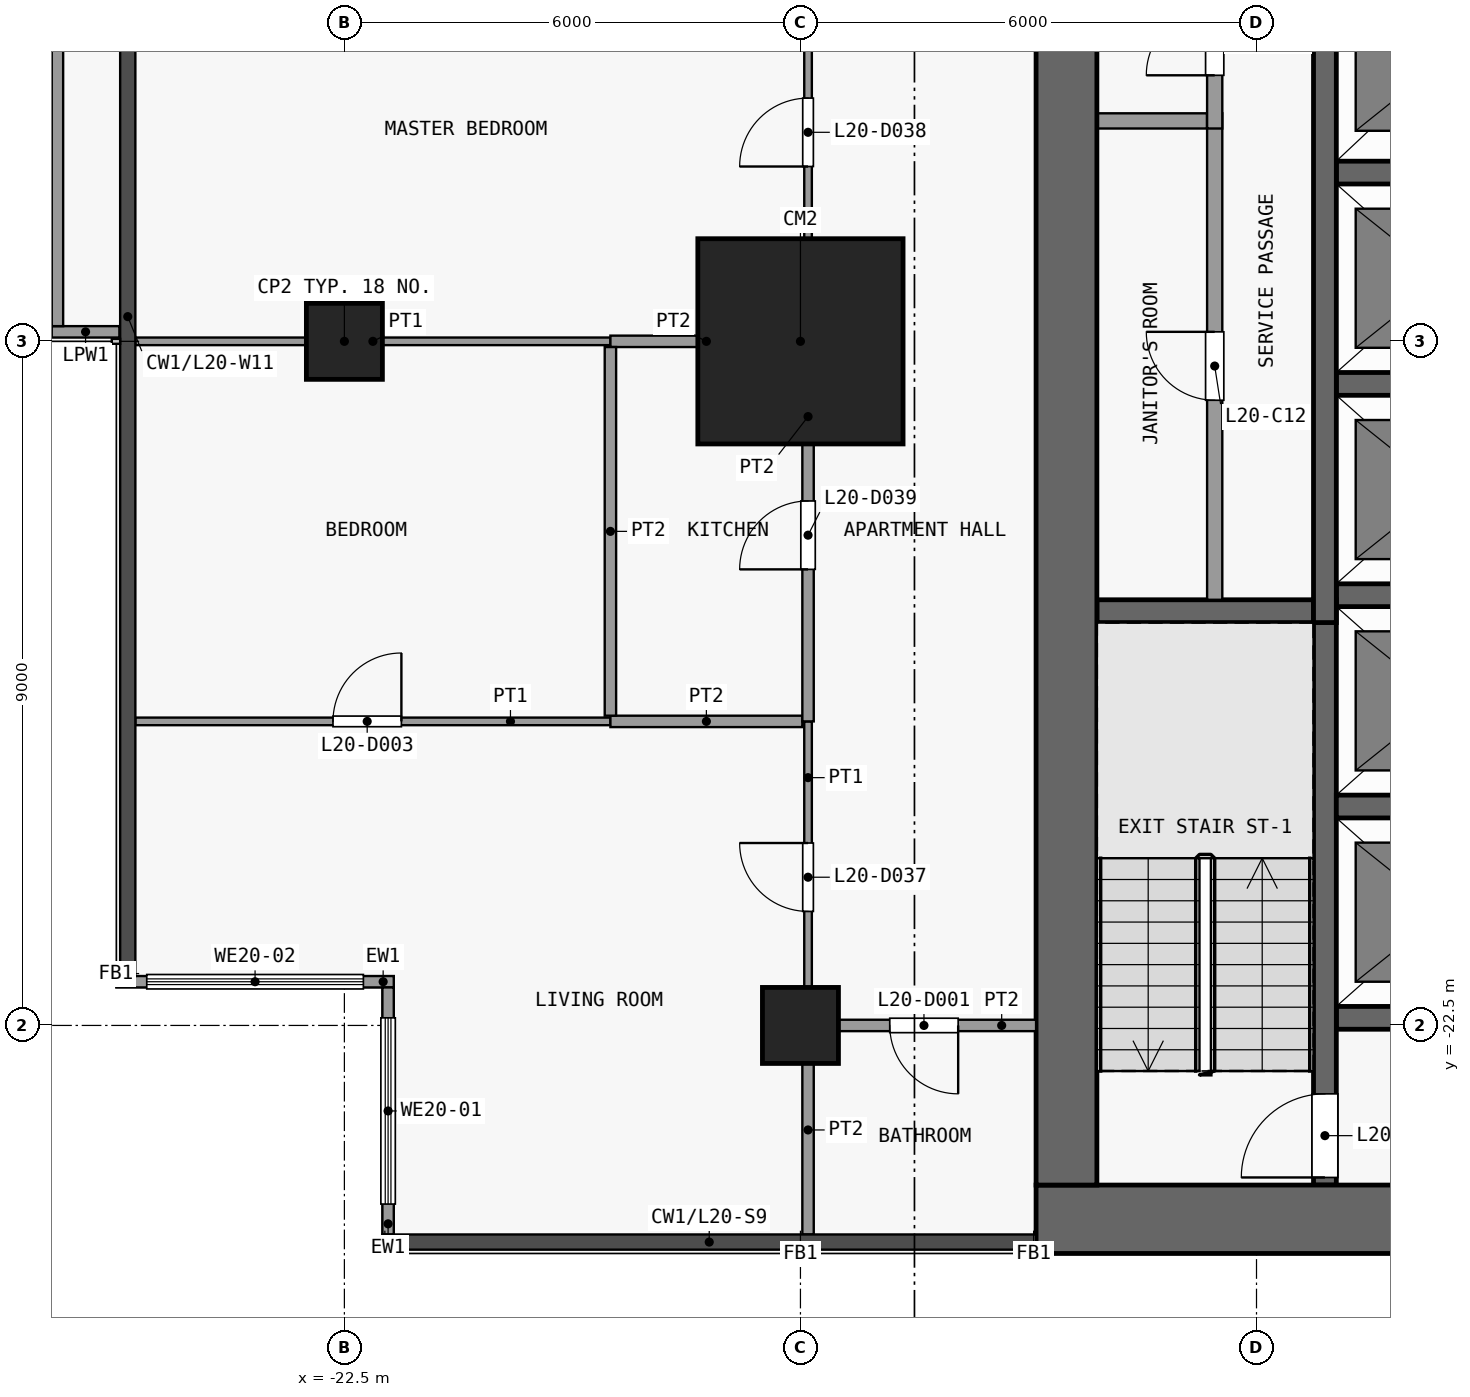
"""IFC4 building model, lengths in metres.
Left out: names, types, materials, properties, quantities, classifications, styles, units other than length and angle.
Written with IfcOpenShell. Run it as: python <this file> out.ifc"""

import sys

from ifc_helpers import new_model, si_unit, direction, frame, frame_2d, origin, origin_2d, place, context, subcontext, project, spatial, rectangle, extrude, element, fill, save


model = new_model("IFC4")
c1 = context("Model", 3, precision=1e-05, world=origin(), true_north=direction((0.0, 1.0)))
c2 = subcontext(c1, "Body", "Model", "MODEL_VIEW")
j1 = project(units=[si_unit("LENGTHUNIT", "METRE"), si_unit("PLANEANGLEUNIT", "RADIAN")], contexts=[c1])
p1 = place(None, origin())
s1 = spatial("IfcSite", under=j1, at=p1, CompositionType="ELEMENT")
p2 = place(p1, origin())
s2 = spatial("IfcBuilding", under=s1, at=p2, CompositionType="ELEMENT")
p3 = place(p2, frame((0.0, 0.0, 84.7)))
s3 = spatial("IfcBuildingStorey", under=s2, at=p3, CompositionType="ELEMENT", Elevation=84.7)
for number, where, z_axis, x_axis in (
    (1, (-22.5, -13.5, 0.0), (0.0, 0.0, 1.0), (1.0, 0.0, 0.0)),
    (2, (-16.5, -22.5, 0.0), (0.0, 0.0, 1.0), (1.0, 0.0, 0.0)),
):
    element("IfcColumn", number, at=place(p3, frame(where, z_axis=z_axis, x_axis=x_axis)), inside=s3, PredefinedType="COLUMN", context=c2, shape_type="SweptSolid", body=[
        extrude(rectangle(XDim=1.0, YDim=1.0, at=origin_2d()), origin(), (0.0, 0.0, 1.0), 3.6),
    ])
p4 = place(p3, frame((-16.5, -13.5, 0.0), z_axis=(0.0, 0.0, 1.0), x_axis=(1.0, 0.0, 0.0)))
e3 = element("IfcColumn", 3, at=p4, inside=s3, PredefinedType="COLUMN", context=c2, shape_type="SweptSolid", body=[
    extrude(rectangle(XDim=2.7, YDim=2.7, at=origin_2d()), origin(), (0.0, 0.0, 1.0), 3.6),
])
p5 = place(p3, frame((-13.4, -25.05, 0.0), z_axis=(0.0, 0.0, 1.0), x_axis=(1.0, 0.0, 0.0)))
e4 = element("IfcWall", 4, at=p5, inside=s3, PredefinedType="SHEAR", context=c2, shape_type="SweptSolid", body=[
    extrude(rectangle(XDim=26.8, YDim=0.9, at=frame_2d((13.4, 0.0))), origin(), (0.0, 0.0, 1.0), 3.3),
])
p6 = place(p3, frame((-13.0, -24.6, 0.0), z_axis=(0.0, 0.0, 1.0), x_axis=(0.0, 1.0, 0.0)))
e5 = element("IfcWall", 5, at=p6, inside=s3, PredefinedType="SHEAR", context=c2, shape_type="SweptSolid", body=[
    extrude(rectangle(XDim=16.1, YDim=0.8, at=frame_2d((8.05, 0.0))), origin(), (0.0, 0.0, 1.0), 3.3),
])
for number, where, z_axis, x_axis in (
    (6, (-9.45, -22.4, 0.0), (0.0, 0.0, 1.0), (1.0, 0.0, 0.0)),
    (7, (-9.45, -19.62, 0.0), (0.0, 0.0, 1.0), (1.0, 0.0, 0.0)),
):
    element("IfcWall", number, at=place(p3, frame(where, z_axis=z_axis, x_axis=x_axis)), inside=s3, PredefinedType="SHEAR", context=c2, shape_type="SweptSolid", body=[
        extrude(rectangle(XDim=2.8, YDim=0.3, at=frame_2d((1.4, 0.0))), origin(), (0.0, 0.0, 1.0), 3.3),
    ])
p7 = place(p3, frame((-12.6, -17.05, 0.0), z_axis=(0.0, 0.0, 1.0), x_axis=(1.0, 0.0, 0.0)))
e8 = element("IfcWall", 8, at=p7, inside=s3, PredefinedType="SHEAR", context=c2, shape_type="SweptSolid", body=[
    extrude(rectangle(XDim=2.85, YDim=0.3, at=frame_2d((1.425, 0.0))), origin(), (0.0, 0.0, 1.0), 3.3),
])
for number, where, z_axis, x_axis in (
    (9, (-9.45, -16.84, 0.0), (0.0, 0.0, 1.0), (1.0, 0.0, 0.0)),
    (10, (-9.45, -14.06, 0.0), (0.0, 0.0, 1.0), (1.0, 0.0, 0.0)),
    (11, (-9.45, -11.28, 0.0), (0.0, 0.0, 1.0), (1.0, 0.0, 0.0)),
):
    element("IfcWall", number, at=place(p3, frame(where, z_axis=z_axis, x_axis=x_axis)), inside=s3, PredefinedType="SHEAR", context=c2, shape_type="SweptSolid", body=[
        extrude(rectangle(XDim=2.8, YDim=0.3, at=frame_2d((1.4, 0.0))), origin(), (0.0, 0.0, 1.0), 3.3),
    ])
p8 = place(p3, frame((-12.6, -10.6, 0.0), z_axis=(0.0, 0.0, 1.0), x_axis=(1.0, 0.0, 0.0)))
e12 = element("IfcWall", 12, at=p8, inside=s3, PredefinedType="PARTITIONING", context=c2, shape_type="SweptSolid", body=[
    extrude(rectangle(XDim=1.45, YDim=0.2, at=frame_2d((0.725, 0.0))), origin(), (0.0, 0.0, 1.0), 3.3),
])
p9 = place(p3, frame((-11.05, -16.9, 0.0), z_axis=(0.0, 0.0, 1.0), x_axis=(0.0, 1.0, 0.0)))
e13 = element("IfcWall", 13, at=p9, inside=s3, PredefinedType="PARTITIONING", context=c2, shape_type="SweptSolid", body=[
    extrude(rectangle(XDim=6.4, YDim=0.2, at=frame_2d((3.2, 0.0))), origin(), (0.0, 0.0, 1.0), 3.3),
])
p10 = place(p9, frame((2.625, 0.0, 0.0)))
e14 = element("IfcOpeningElement", 14, at=p10, cuts=e13, PredefinedType="OPENING", context=c2, shape_type="SweptSolid", body=[
    extrude(rectangle(XDim=0.9, YDim=2.1, at=frame_2d((0.45, 1.05))), frame((0.0, 0.11, 0.0), z_axis=(0.0, -1.0, 0.0), x_axis=(1.0, 0.0, 0.0)), (0.0, 0.0, 1.0), 0.22),
])
p11 = place(p3, frame((-11.05, -10.7, 0.0), z_axis=(0.0, 0.0, 1.0), x_axis=(0.0, 1.0, 0.0)))
e15 = element("IfcWall", 15, at=p11, inside=s3, PredefinedType="PARTITIONING", context=c2, shape_type="SweptSolid", body=[
    extrude(rectangle(XDim=2.2, YDim=0.2, at=frame_2d((1.1, 0.0))), origin(), (0.0, 0.0, 1.0), 3.3),
])
p12 = place(p11, frame((0.7, 0.0, 0.0)))
e16 = element("IfcOpeningElement", 16, at=p12, cuts=e15, PredefinedType="OPENING", context=c2, shape_type="SweptSolid", body=[
    extrude(rectangle(XDim=0.9, YDim=2.1, at=frame_2d((0.45, 1.05))), frame((0.0, 0.11, 0.0), z_axis=(0.0, -1.0, 0.0), x_axis=(1.0, 0.0, 0.0)), (0.0, 0.0, 1.0), 0.22),
])
p13 = place(p3, frame((-9.6, -24.6, 0.0), z_axis=(0.0, 0.0, 1.0), x_axis=(0.0, 1.0, 0.0)))
e17 = element("IfcWall", 17, at=p13, inside=s3, PredefinedType="SHEAR", context=c2, shape_type="SweptSolid", body=[
    extrude(rectangle(XDim=7.7, YDim=0.3, at=frame_2d((3.85, 0.0))), origin(), (0.0, 0.0, 1.0), 3.3),
])
p14 = place(p13, frame((0.1, 0.0, 0.0)))
e18 = element("IfcOpeningElement", 18, at=p14, cuts=e17, PredefinedType="OPENING", context=c2, shape_type="SweptSolid", body=[
    extrude(rectangle(XDim=1.1, YDim=2.1, at=frame_2d((0.55, 1.05))), frame((0.0, 0.16, 0.0), z_axis=(0.0, -1.0, 0.0), x_axis=(1.0, 0.0, 0.0)), (0.0, 0.0, 1.0), 0.32),
])
p15 = place(p3, frame((-9.6, -17.2, 0.0), z_axis=(0.0, 0.0, 1.0), x_axis=(0.0, 1.0, 0.0)))
e19 = element("IfcWall", 19, at=p15, inside=s3, PredefinedType="SHEAR", context=c2, shape_type="SweptSolid", body=[
    extrude(rectangle(XDim=8.7, YDim=0.3, at=frame_2d((4.35, 0.0))), origin(), (0.0, 0.0, 1.0), 3.3),
])
p16 = place(p3, frame((-21.925, -25.25, 0.0), z_axis=(0.0, 0.0, 1.0), x_axis=(0.0, 1.0, 0.0)))
e20 = element("IfcWall", 20, at=p16, inside=s3, PredefinedType="SOLIDWALL", context=c2, shape_type="SweptSolid", body=[
    extrude(rectangle(XDim=3.25, YDim=0.15, at=frame_2d((1.625, 0.0))), origin(), (0.0, 0.0, 1.0), 3.3),
])
p17 = place(p16, frame((0.4, 0.0, 0.9)))
e21 = element("IfcOpeningElement", 21, at=p17, cuts=e20, PredefinedType="OPENING", context=c2, shape_type="SweptSolid", body=[
    extrude(rectangle(XDim=2.45, YDim=2.4, at=frame_2d((1.225, 1.2))), frame((0.0, 0.085, 0.0), z_axis=(0.0, -1.0, 0.0), x_axis=(1.0, 0.0, 0.0)), (0.0, 0.0, 1.0), 0.17),
])
p18 = place(p3, frame((-21.85, -21.925, 0.0), z_axis=(0.0, 0.0, 1.0), x_axis=(-1.0, 0.0, 0.0)))
e22 = element("IfcWall", 22, at=p18, inside=s3, PredefinedType="SOLIDWALL", context=c2, shape_type="SweptSolid", body=[
    extrude(rectangle(XDim=3.65, YDim=0.15, at=frame_2d((1.825, 0.0))), origin(), (0.0, 0.0, 1.0), 3.3),
])
p19 = place(p18, frame((0.4, 0.0, 0.9)))
e23 = element("IfcOpeningElement", 23, at=p19, cuts=e22, PredefinedType="OPENING", context=c2, shape_type="SweptSolid", body=[
    extrude(rectangle(XDim=2.85, YDim=2.4, at=frame_2d((1.425, 1.2))), frame((0.0, 0.085, 0.0), z_axis=(0.0, -1.0, 0.0), x_axis=(1.0, 0.0, 0.0)), (0.0, 0.0, 1.0), 0.17),
])
p20 = place(p3, frame((-25.46, -13.375, 0.0), z_axis=(0.0, 0.0, 1.0), x_axis=(-1.0, 0.0, 0.0)))
e24 = element("IfcWall", 24, at=p20, inside=s3, PredefinedType="PARAPET", context=c2, shape_type="SweptSolid", body=[
    extrude(rectangle(XDim=0.89, YDim=0.15, at=frame_2d((0.445, 0.0))), origin(), (0.0, 0.0, 1.0), 1.15),
])
p21 = place(p3, frame((-26.275, -13.3, 0.0), z_axis=(0.0, 0.0, 1.0), x_axis=(0.0, 1.0, 0.0)))
e25 = element("IfcWall", 25, at=p21, inside=s3, PredefinedType="PARAPET", context=c2, shape_type="SweptSolid", body=[
    extrude(rectangle(XDim=8.84, YDim=0.15, at=frame_2d((4.42, 0.0))), origin(), (0.0, 0.0, 1.0), 1.15),
])
p22 = place(p3, frame((-16.325, -22.5, 0.0), z_axis=(0.0, 0.0, 1.0), x_axis=(1.0, 0.0, 0.0)))
e26 = element("IfcWall", 26, at=p22, inside=s3, PredefinedType="PARTITIONING", context=c2, shape_type="SweptSolid", body=[
    extrude(rectangle(XDim=2.925, YDim=0.15, at=frame_2d((1.462, 0.0))), origin(), (0.0, 0.0, 1.0), 3.3),
])
p23 = place(p22, frame((1.0, 0.0, 0.0)))
e27 = element("IfcOpeningElement", 27, at=p23, cuts=e26, PredefinedType="OPENING", context=c2, shape_type="SweptSolid", body=[
    extrude(rectangle(XDim=0.9, YDim=2.1, at=frame_2d((0.45, 1.05))), frame((0.0, 0.085, 0.0), z_axis=(0.0, -1.0, 0.0), x_axis=(1.0, 0.0, 0.0)), (0.0, 0.0, 1.0), 0.17),
])
p24 = place(p3, frame((-25.25, -18.5, 0.0), z_axis=(0.0, 0.0, 1.0), x_axis=(1.0, 0.0, 0.0)))
e28 = element("IfcWall", 28, at=p24, inside=s3, PredefinedType="PARTITIONING", context=c2, shape_type="SweptSolid", body=[
    extrude(rectangle(XDim=6.25, YDim=0.1, at=frame_2d((3.125, 0.0))), origin(), (0.0, 0.0, 1.0), 3.3),
])
p25 = place(p24, frame((2.6, 0.0, 0.0)))
e29 = element("IfcOpeningElement", 29, at=p25, cuts=e28, PredefinedType="OPENING", context=c2, shape_type="SweptSolid", body=[
    extrude(rectangle(XDim=0.9, YDim=2.1, at=frame_2d((0.45, 1.05))), frame((0.0, 0.06, 0.0), z_axis=(0.0, -1.0, 0.0), x_axis=(1.0, 0.0, 0.0)), (0.0, 0.0, 1.0), 0.12),
])
p26 = place(p3, frame((-19.0, -18.5, 0.0), z_axis=(0.0, 0.0, 1.0), x_axis=(1.0, 0.0, 0.0)))
e30 = element("IfcWall", 30, at=p26, inside=s3, PredefinedType="PARTITIONING", context=c2, shape_type="SweptSolid", body=[
    extrude(rectangle(XDim=2.525, YDim=0.15, at=frame_2d((1.262, 0.0))), origin(), (0.0, 0.0, 1.0), 3.3),
])
p27 = place(p3, frame((-25.25, -13.5, 0.0), z_axis=(0.0, 0.0, 1.0), x_axis=(1.0, 0.0, 0.0)))
e31 = element("IfcWall", 31, at=p27, inside=s3, PredefinedType="PARTITIONING", context=c2, shape_type="SweptSolid", body=[
    extrude(rectangle(XDim=6.25, YDim=0.1, at=frame_2d((3.125, 0.0))), origin(), (0.0, 0.0, 1.0), 3.3),
])
p28 = place(p3, frame((-19.0, -13.5, 0.0), z_axis=(0.0, 0.0, 1.0), x_axis=(1.0, 0.0, 0.0)))
e32 = element("IfcWall", 32, at=p28, inside=s3, PredefinedType="PARTITIONING", context=c2, shape_type="SweptSolid", body=[
    extrude(rectangle(XDim=2.525, YDim=0.15, at=frame_2d((1.262, 0.0))), origin(), (0.0, 0.0, 1.0), 3.3),
])
p29 = place(p3, frame((-19.0, -18.425, 0.0), z_axis=(0.0, 0.0, 1.0), x_axis=(0.0, 1.0, 0.0)))
e33 = element("IfcWall", 33, at=p29, inside=s3, PredefinedType="PARTITIONING", context=c2, shape_type="SweptSolid", body=[
    extrude(rectangle(XDim=4.85, YDim=0.15, at=frame_2d((2.425, 0.0))), origin(), (0.0, 0.0, 1.0), 3.3),
])
p30 = place(p3, frame((-16.4, -22.5, 0.0), z_axis=(0.0, 0.0, 1.0), x_axis=(0.0, 1.0, 0.0)))
e34 = element("IfcWall", 34, at=p30, inside=s3, PredefinedType="PARTITIONING", context=c2, shape_type="SweptSolid", body=[
    extrude(rectangle(XDim=4.0, YDim=0.1, at=frame_2d((2.0, 0.0))), origin(), (0.0, 0.0, 1.0), 3.3),
])
p31 = place(p30, frame((1.5, 0.0, 0.0)))
e35 = element("IfcOpeningElement", 35, at=p31, cuts=e34, PredefinedType="OPENING", context=c2, shape_type="SweptSolid", body=[
    extrude(rectangle(XDim=0.9, YDim=2.1, at=frame_2d((0.45, 1.05))), frame((0.0, 0.06, 0.0), z_axis=(0.0, -1.0, 0.0), x_axis=(1.0, 0.0, 0.0)), (0.0, 0.0, 1.0), 0.12),
])
p32 = place(p3, frame((-16.4, -13.5, 0.0), z_axis=(0.0, 0.0, 1.0), x_axis=(0.0, 1.0, 0.0)))
e36 = element("IfcWall", 36, at=p32, inside=s3, PredefinedType="PARTITIONING", context=c2, shape_type="SweptSolid", body=[
    extrude(rectangle(XDim=5.5, YDim=0.1, at=frame_2d((2.75, 0.0))), origin(), (0.0, 0.0, 1.0), 3.3),
])
p33 = place(p32, frame((2.3, 0.0, 0.0)))
e37 = element("IfcOpeningElement", 37, at=p33, cuts=e36, PredefinedType="OPENING", context=c2, shape_type="SweptSolid", body=[
    extrude(rectangle(XDim=0.9, YDim=2.1, at=frame_2d((0.45, 1.05))), frame((0.0, 0.06, 0.0), z_axis=(0.0, -1.0, 0.0), x_axis=(1.0, 0.0, 0.0)), (0.0, 0.0, 1.0), 0.12),
])
p34 = place(p3, frame((-16.4, -25.25, 0.0), z_axis=(0.0, 0.0, 1.0), x_axis=(0.0, 1.0, 0.0)))
e38 = element("IfcWall", 38, at=p34, inside=s3, PredefinedType="PARTITIONING", context=c2, shape_type="SweptSolid", body=[
    extrude(rectangle(XDim=2.75, YDim=0.15, at=frame_2d((1.375, 0.0))), origin(), (0.0, 0.0, 1.0), 3.3),
])
p35 = place(p3, frame((-16.4, -18.5, 0.0), z_axis=(0.0, 0.0, 1.0), x_axis=(0.0, 1.0, 0.0)))
e39 = element("IfcWall", 39, at=p35, inside=s3, PredefinedType="PARTITIONING", context=c2, shape_type="SweptSolid", body=[
    extrude(rectangle(XDim=5.0, YDim=0.15, at=frame_2d((2.5, 0.0))), origin(), (0.0, 0.0, 1.0), 3.3),
])
p36 = place(p35, frame((2.0, 0.0, 0.0)))
e40 = element("IfcOpeningElement", 40, at=p36, cuts=e39, PredefinedType="OPENING", context=c2, shape_type="SweptSolid", body=[
    extrude(rectangle(XDim=0.9, YDim=2.1, at=frame_2d((0.45, 1.05))), frame((0.0, 0.085, 0.0), z_axis=(0.0, -1.0, 0.0), x_axis=(1.0, 0.0, 0.0)), (0.0, 0.0, 1.0), 0.17),
])
p37 = place(p12, origin())
e41 = element("IfcDoor", 41, at=p37, inside=s3, OperationType="SINGLE_SWING_LEFT", PredefinedType="DOOR", context=c2, shape_type="SweptSolid", body=[
    extrude(rectangle(XDim=0.9, YDim=2.1, at=frame_2d((0.45, 1.05))), frame((0.0, 0.025, 0.0), z_axis=(0.0, -1.0, 0.0), x_axis=(1.0, 0.0, 0.0)), (0.0, 0.0, 1.0), 0.05),
])
fill(e16, e41)
p38 = place(p10, origin())
e42 = element("IfcDoor", 42, at=p38, inside=s3, OperationType="SINGLE_SWING_RIGHT", PredefinedType="DOOR", context=c2, shape_type="SweptSolid", body=[
    extrude(rectangle(XDim=0.9, YDim=2.1, at=frame_2d((0.45, 1.05))), frame((0.0, 0.025, 0.0), z_axis=(0.0, -1.0, 0.0), x_axis=(1.0, 0.0, 0.0)), (0.0, 0.0, 1.0), 0.05),
])
fill(e14, e42)
p39 = place(p14, origin())
e43 = element("IfcDoor", 43, at=p39, inside=s3, OperationType="SINGLE_SWING_LEFT", PredefinedType="DOOR", context=c2, shape_type="SweptSolid", body=[
    extrude(rectangle(XDim=1.1, YDim=2.1, at=frame_2d((0.55, 1.05))), frame((0.0, 0.025, 0.0), z_axis=(0.0, -1.0, 0.0), x_axis=(1.0, 0.0, 0.0)), (0.0, 0.0, 1.0), 0.05),
])
fill(e18, e43)
p40 = place(p17, origin())
e44 = element("IfcWindow", 44, at=p40, inside=s3, PartitioningType="SINGLE_PANEL", PredefinedType="WINDOW", context=c2, shape_type="SweptSolid", body=[
    extrude(rectangle(XDim=2.45, YDim=2.4, at=frame_2d((1.225, 1.2))), frame((0.0, 0.03, 0.0), z_axis=(0.0, -1.0, 0.0), x_axis=(1.0, 0.0, 0.0)), (0.0, 0.0, 1.0), 0.06),
])
fill(e21, e44)
p41 = place(p19, origin())
e45 = element("IfcWindow", 45, at=p41, inside=s3, PartitioningType="SINGLE_PANEL", PredefinedType="WINDOW", context=c2, shape_type="SweptSolid", body=[
    extrude(rectangle(XDim=2.85, YDim=2.4, at=frame_2d((1.425, 1.2))), frame((0.0, 0.03, 0.0), z_axis=(0.0, -1.0, 0.0), x_axis=(1.0, 0.0, 0.0)), (0.0, 0.0, 1.0), 0.06),
])
fill(e23, e45)
p42 = place(p23, origin())
e46 = element("IfcDoor", 46, at=p42, inside=s3, OperationType="SINGLE_SWING_RIGHT", PredefinedType="DOOR", context=c2, shape_type="SweptSolid", body=[
    extrude(rectangle(XDim=0.9, YDim=2.1, at=frame_2d((0.45, 1.05))), frame((0.0, 0.025, 0.0), z_axis=(0.0, -1.0, 0.0), x_axis=(1.0, 0.0, 0.0)), (0.0, 0.0, 1.0), 0.05),
])
fill(e27, e46)
p43 = place(p25, origin())
e47 = element("IfcDoor", 47, at=p43, inside=s3, OperationType="SINGLE_SWING_LEFT", PredefinedType="DOOR", context=c2, shape_type="SweptSolid", body=[
    extrude(rectangle(XDim=0.9, YDim=2.1, at=frame_2d((0.45, 1.05))), frame((0.0, 0.025, 0.0), z_axis=(0.0, -1.0, 0.0), x_axis=(1.0, 0.0, 0.0)), (0.0, 0.0, 1.0), 0.05),
])
fill(e29, e47)
p44 = place(p31, origin())
e48 = element("IfcDoor", 48, at=p44, inside=s3, OperationType="SINGLE_SWING_LEFT", PredefinedType="DOOR", context=c2, shape_type="SweptSolid", body=[
    extrude(rectangle(XDim=0.9, YDim=2.1, at=frame_2d((0.45, 1.05))), frame((0.0, 0.025, 0.0), z_axis=(0.0, -1.0, 0.0), x_axis=(1.0, 0.0, 0.0)), (0.0, 0.0, 1.0), 0.05),
])
fill(e35, e48)
p45 = place(p33, origin())
e49 = element("IfcDoor", 49, at=p45, inside=s3, OperationType="SINGLE_SWING_RIGHT", PredefinedType="DOOR", context=c2, shape_type="SweptSolid", body=[
    extrude(rectangle(XDim=0.9, YDim=2.1, at=frame_2d((0.45, 1.05))), frame((0.0, 0.025, 0.0), z_axis=(0.0, -1.0, 0.0), x_axis=(1.0, 0.0, 0.0)), (0.0, 0.0, 1.0), 0.05),
])
fill(e37, e49)
p46 = place(p36, origin())
e50 = element("IfcDoor", 50, at=p46, inside=s3, OperationType="SINGLE_SWING_RIGHT", PredefinedType="DOOR", context=c2, shape_type="SweptSolid", body=[
    extrude(rectangle(XDim=0.9, YDim=2.1, at=frame_2d((0.45, 1.05))), frame((0.0, 0.025, 0.0), z_axis=(0.0, -1.0, 0.0), x_axis=(1.0, 0.0, 0.0)), (0.0, 0.0, 1.0), 0.05),
])
fill(e40, e50)
save(model, sys.argv[1])
